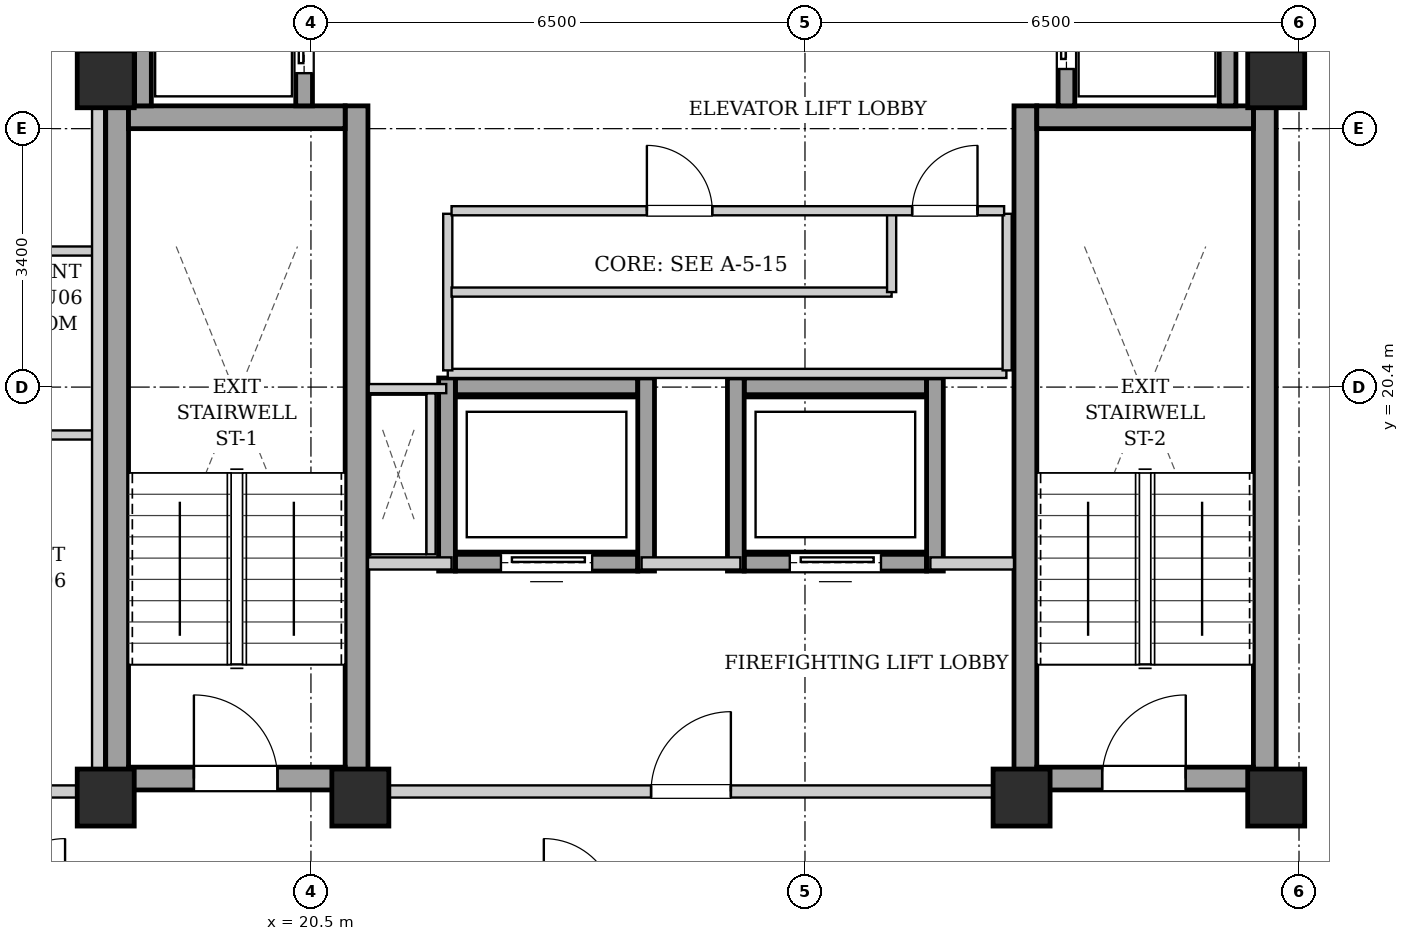
"""IFC4 building model, lengths in metres.
Left out: names, types, materials, properties, quantities, classifications, styles, units other than length and angle.
Written with IfcOpenShell. Run it as: python <this file> out.ifc"""

import sys

from ifc_helpers import new_model, si_unit, direction, frame, frame_2d, origin, origin_2d, place, context, subcontext, project, spatial, rectangle, extrude, element, fill, save


model = new_model("IFC4")
c1 = context("Model", 3, precision=1e-05, world=origin(), true_north=direction((0.0, 1.0)))
c2 = subcontext(c1, "Body", "Model", "MODEL_VIEW")
j1 = project(units=[si_unit("LENGTHUNIT", "METRE"), si_unit("PLANEANGLEUNIT", "RADIAN")], contexts=[c1])
p1 = place(None, origin())
s1 = spatial("IfcSite", under=j1, at=p1, CompositionType="ELEMENT")
p2 = place(p1, origin())
s2 = spatial("IfcBuilding", under=s1, at=p2, CompositionType="ELEMENT")
p3 = place(p2, frame((0.0, 0.0, 220.7)))
s3 = spatial("IfcBuildingStorey", under=s2, at=p3, CompositionType="ELEMENT", Elevation=220.7)
for number, where, z_axis, x_axis in (
    (1, (17.8, 15.0, 0.0), (0.0, 0.0, 1.0), (1.0, 0.0, 0.0)),
    (2, (21.15, 15.0, 0.0), (0.0, 0.0, 1.0), (1.0, 0.0, 0.0)),
    (3, (29.85, 15.0, 0.0), (0.0, 0.0, 1.0), (1.0, 0.0, 0.0)),
    (4, (33.2, 15.0, 0.0), (0.0, 0.0, 1.0), (1.0, 0.0, 0.0)),
    (5, (17.8, 24.45, 0.0), (0.0, 0.0, 1.0), (1.0, 0.0, 0.0)),
    (6, (33.2, 24.45, 0.0), (0.0, 0.0, 1.0), (1.0, 0.0, 0.0)),
):
    element("IfcColumn", number, at=place(p3, frame(where, z_axis=z_axis, x_axis=x_axis)), inside=s3, PredefinedType="COLUMN", context=c2, shape_type="SweptSolid", body=[
        extrude(rectangle(XDim=0.75, YDim=0.75, at=origin_2d()), origin(), (0.0, 0.0, 1.0), 3.4),
    ])
for number, where, z_axis, x_axis in (
    (7, (17.95, 15.1, 0.0), (0.0, 0.0, 1.0), (0.0, 1.0, 0.0)),
    (8, (21.1, 15.1, 0.0), (0.0, 0.0, 1.0), (0.0, 1.0, 0.0)),
):
    element("IfcWall", number, at=place(p3, frame(where, z_axis=z_axis, x_axis=x_axis)), inside=s3, PredefinedType="SHEAR", context=c2, shape_type="SweptSolid", body=[
        extrude(rectangle(XDim=9.0, YDim=0.3, at=frame_2d((4.5, 0.0))), origin(), (0.0, 0.0, 1.0), 3.14),
    ])
p4 = place(p3, frame((18.1, 23.95, 0.0), z_axis=(0.0, 0.0, 1.0), x_axis=(1.0, 0.0, 0.0)))
e9 = element("IfcWall", 9, at=p4, inside=s3, PredefinedType="SHEAR", context=c2, shape_type="SweptSolid", body=[
    extrude(rectangle(XDim=2.85, YDim=0.3, at=frame_2d((1.425, 0.0))), origin(), (0.0, 0.0, 1.0), 3.14),
])
p5 = place(p3, frame((18.1, 15.25, 0.0), z_axis=(0.0, 0.0, 1.0), x_axis=(1.0, 0.0, 0.0)))
e10 = element("IfcWall", 10, at=p5, inside=s3, PredefinedType="SHEAR", context=c2, shape_type="SweptSolid", body=[
    extrude(rectangle(XDim=2.85, YDim=0.3, at=frame_2d((1.425, 0.0))), origin(), (0.0, 0.0, 1.0), 3.14),
])
p6 = place(p5, frame((0.86, 0.0, 0.0)))
e11 = element("IfcOpeningElement", 11, at=p6, cuts=e10, PredefinedType="OPENING", context=c2, shape_type="SweptSolid", body=[
    extrude(rectangle(XDim=1.1, YDim=2.05, at=frame_2d((0.55, 1.025))), frame((0.0, 0.16, 0.0), z_axis=(0.0, -1.0, 0.0), x_axis=(1.0, 0.0, 0.0)), (0.0, 0.0, 1.0), 0.32),
])
for number, where, z_axis, x_axis in (
    (12, (29.9, 15.1, 0.0), (0.0, 0.0, 1.0), (0.0, 1.0, 0.0)),
    (13, (33.05, 15.1, 0.0), (0.0, 0.0, 1.0), (0.0, 1.0, 0.0)),
):
    element("IfcWall", number, at=place(p3, frame(where, z_axis=z_axis, x_axis=x_axis)), inside=s3, PredefinedType="SHEAR", context=c2, shape_type="SweptSolid", body=[
        extrude(rectangle(XDim=9.0, YDim=0.3, at=frame_2d((4.5, 0.0))), origin(), (0.0, 0.0, 1.0), 3.14),
    ])
p7 = place(p3, frame((30.05, 23.95, 0.0), z_axis=(0.0, 0.0, 1.0), x_axis=(1.0, 0.0, 0.0)))
e14 = element("IfcWall", 14, at=p7, inside=s3, PredefinedType="SHEAR", context=c2, shape_type="SweptSolid", body=[
    extrude(rectangle(XDim=2.85, YDim=0.3, at=frame_2d((1.425, 0.0))), origin(), (0.0, 0.0, 1.0), 3.14),
])
p8 = place(p3, frame((30.05, 15.25, 0.0), z_axis=(0.0, 0.0, 1.0), x_axis=(1.0, 0.0, 0.0)))
e15 = element("IfcWall", 15, at=p8, inside=s3, PredefinedType="SHEAR", context=c2, shape_type="SweptSolid", body=[
    extrude(rectangle(XDim=2.85, YDim=0.3, at=frame_2d((1.425, 0.0))), origin(), (0.0, 0.0, 1.0), 3.14),
])
p9 = place(p8, frame((0.86, 0.0, 0.0)))
e16 = element("IfcOpeningElement", 16, at=p9, cuts=e15, PredefinedType="OPENING", context=c2, shape_type="SweptSolid", body=[
    extrude(rectangle(XDim=1.1, YDim=2.05, at=frame_2d((0.55, 1.025))), frame((0.0, 0.16, 0.0), z_axis=(0.0, -1.0, 0.0), x_axis=(1.0, 0.0, 0.0)), (0.0, 0.0, 1.0), 0.32),
])
p10 = place(p3, frame((18.29, 24.1, 0.0), z_axis=(0.0, 0.0, 1.0), x_axis=(0.0, 1.0, 0.0)))
e17 = element("IfcWall", 17, at=p10, inside=s3, PredefinedType="SHEAR", context=c2, shape_type="SweptSolid", body=[
    extrude(rectangle(XDim=4.14, YDim=0.22, at=frame_2d((2.07, 0.0))), origin(), (0.0, 0.0, 1.0), 3.14),
])
p11 = place(p3, frame((20.41, 24.1, 0.0), z_axis=(0.0, 0.0, 1.0), x_axis=(0.0, 1.0, 0.0)))
e18 = element("IfcWall", 18, at=p11, inside=s3, PredefinedType="SHEAR", context=c2, shape_type="SweptSolid", body=[
    extrude(rectangle(XDim=1.96, YDim=0.22, at=frame_2d((0.98, 0.0))), origin(), (0.0, 0.0, 1.0), 3.14),
])
p12 = place(p11, frame((0.43, 0.0, 0.0)))
e19 = element("IfcOpeningElement", 19, at=p12, cuts=e18, PredefinedType="OPENING", context=c2, shape_type="SweptSolid", body=[
    extrude(rectangle(XDim=1.1, YDim=2.15, at=frame_2d((0.55, 1.075))), frame((0.0, 0.12, 0.0), z_axis=(0.0, -1.0, 0.0), x_axis=(1.0, 0.0, 0.0)), (0.0, 0.0, 1.0), 0.24),
])
p13 = place(p3, frame((30.44, 24.1, 0.0), z_axis=(0.0, 0.0, 1.0), x_axis=(0.0, 1.0, 0.0)))
e20 = element("IfcWall", 20, at=p13, inside=s3, PredefinedType="SHEAR", context=c2, shape_type="SweptSolid", body=[
    extrude(rectangle(XDim=2.07, YDim=0.22, at=frame_2d((1.035, 0.0))), origin(), (0.0, 0.0, 1.0), 3.14),
])
p14 = place(p13, frame((0.485, 0.0, 0.0)))
e21 = element("IfcOpeningElement", 21, at=p14, cuts=e20, PredefinedType="OPENING", context=c2, shape_type="SweptSolid", body=[
    extrude(rectangle(XDim=1.1, YDim=2.15, at=frame_2d((0.55, 1.075))), frame((0.0, 0.12, 0.0), z_axis=(0.0, -1.0, 0.0), x_axis=(1.0, 0.0, 0.0)), (0.0, 0.0, 1.0), 0.24),
])
p15 = place(p3, frame((32.56, 24.1, 0.0), z_axis=(0.0, 0.0, 1.0), x_axis=(0.0, 1.0, 0.0)))
e22 = element("IfcWall", 22, at=p15, inside=s3, PredefinedType="SHEAR", context=c2, shape_type="SweptSolid", body=[
    extrude(rectangle(XDim=2.07, YDim=0.22, at=frame_2d((1.035, 0.0))), origin(), (0.0, 0.0, 1.0), 3.14),
])
p16 = place(p3, frame((22.4, 18.09, 0.0), z_axis=(0.0, 0.0, 1.0), x_axis=(1.0, 0.0, 0.0)))
e23 = element("IfcWall", 23, at=p16, inside=s3, PredefinedType="SHEAR", context=c2, shape_type="SweptSolid", body=[
    extrude(rectangle(XDim=2.4, YDim=0.22, at=frame_2d((1.2, 0.0))), origin(), (0.0, 0.0, 1.0), 3.14),
])
p17 = place(p16, frame((0.6, 0.0, 0.0)))
e24 = element("IfcOpeningElement", 24, at=p17, cuts=e23, PredefinedType="OPENING", context=c2, shape_type="SweptSolid", body=[
    extrude(rectangle(XDim=1.2, YDim=2.15, at=frame_2d((0.6, 1.075))), frame((0.0, 0.12, 0.0), z_axis=(0.0, -1.0, 0.0), x_axis=(1.0, 0.0, 0.0)), (0.0, 0.0, 1.0), 0.24),
])
p18 = place(p3, frame((22.4, 20.41, 0.0), z_axis=(0.0, 0.0, 1.0), x_axis=(1.0, 0.0, 0.0)))
e25 = element("IfcWall", 25, at=p18, inside=s3, PredefinedType="SHEAR", context=c2, shape_type="SweptSolid", body=[
    extrude(rectangle(XDim=2.4, YDim=0.22, at=frame_2d((1.2, 0.0))), origin(), (0.0, 0.0, 1.0), 3.14),
])
for number, where, z_axis, x_axis in (
    (26, (22.29, 17.98, 0.0), (0.0, 0.0, 1.0), (0.0, 1.0, 0.0)),
    (27, (24.91, 17.98, 0.0), (0.0, 0.0, 1.0), (0.0, 1.0, 0.0)),
):
    element("IfcWall", number, at=place(p3, frame(where, z_axis=z_axis, x_axis=x_axis)), inside=s3, PredefinedType="SHEAR", context=c2, shape_type="SweptSolid", body=[
        extrude(rectangle(XDim=2.54, YDim=0.22, at=frame_2d((1.27, 0.0))), origin(), (0.0, 0.0, 1.0), 3.14),
    ])
p19 = place(p3, frame((26.2, 18.09, 0.0), z_axis=(0.0, 0.0, 1.0), x_axis=(1.0, 0.0, 0.0)))
e28 = element("IfcWall", 28, at=p19, inside=s3, PredefinedType="SHEAR", context=c2, shape_type="SweptSolid", body=[
    extrude(rectangle(XDim=2.4, YDim=0.22, at=frame_2d((1.2, 0.0))), origin(), (0.0, 0.0, 1.0), 3.14),
])
p20 = place(p19, frame((0.6, 0.0, 0.0)))
e29 = element("IfcOpeningElement", 29, at=p20, cuts=e28, PredefinedType="OPENING", context=c2, shape_type="SweptSolid", body=[
    extrude(rectangle(XDim=1.2, YDim=2.15, at=frame_2d((0.6, 1.075))), frame((0.0, 0.12, 0.0), z_axis=(0.0, -1.0, 0.0), x_axis=(1.0, 0.0, 0.0)), (0.0, 0.0, 1.0), 0.24),
])
p21 = place(p3, frame((26.2, 20.41, 0.0), z_axis=(0.0, 0.0, 1.0), x_axis=(1.0, 0.0, 0.0)))
e30 = element("IfcWall", 30, at=p21, inside=s3, PredefinedType="SHEAR", context=c2, shape_type="SweptSolid", body=[
    extrude(rectangle(XDim=2.4, YDim=0.22, at=frame_2d((1.2, 0.0))), origin(), (0.0, 0.0, 1.0), 3.14),
])
for number, where, z_axis, x_axis in (
    (31, (26.09, 17.98, 0.0), (0.0, 0.0, 1.0), (0.0, 1.0, 0.0)),
    (32, (28.71, 17.98, 0.0), (0.0, 0.0, 1.0), (0.0, 1.0, 0.0)),
):
    element("IfcWall", number, at=place(p3, frame(where, z_axis=z_axis, x_axis=x_axis)), inside=s3, PredefinedType="SHEAR", context=c2, shape_type="SweptSolid", body=[
        extrude(rectangle(XDim=2.54, YDim=0.22, at=frame_2d((1.27, 0.0))), origin(), (0.0, 0.0, 1.0), 3.14),
    ])
p22 = place(p3, frame((21.25, 15.08, 0.0), z_axis=(0.0, 0.0, 1.0), x_axis=(1.0, 0.0, 0.0)))
e33 = element("IfcWall", 33, at=p22, inside=s3, PredefinedType="PARTITIONING", context=c2, shape_type="SweptSolid", body=[
    extrude(rectangle(XDim=8.5, YDim=0.16, at=frame_2d((4.25, 0.0))), origin(), (0.0, 0.0, 1.0), 2.668),
])
p23 = place(p22, frame((3.725, 0.0, 0.0)))
e34 = element("IfcOpeningElement", 34, at=p23, cuts=e33, PredefinedType="OPENING", context=c2, shape_type="SweptSolid", body=[
    extrude(rectangle(XDim=1.05, YDim=2.05, at=frame_2d((0.525, 1.025))), frame((0.0, 0.09, 0.0), z_axis=(0.0, -1.0, 0.0), x_axis=(1.0, 0.0, 0.0)), (0.0, 0.0, 1.0), 0.18),
])
p24 = place(p3, frame((21.25, 18.08, 0.0), z_axis=(0.0, 0.0, 1.0), x_axis=(1.0, 0.0, 0.0)))
e35 = element("IfcWall", 35, at=p24, inside=s3, PredefinedType="PARTITIONING", context=c2, shape_type="SweptSolid", body=[
    extrude(rectangle(XDim=1.1, YDim=0.16, at=frame_2d((0.55, 0.0))), origin(), (0.0, 0.0, 1.0), 3.14),
])
p25 = place(p3, frame((24.85, 18.08, 0.0), z_axis=(0.0, 0.0, 1.0), x_axis=(1.0, 0.0, 0.0)))
e36 = element("IfcWall", 36, at=p25, inside=s3, PredefinedType="PARTITIONING", context=c2, shape_type="SweptSolid", body=[
    extrude(rectangle(XDim=1.3, YDim=0.16, at=frame_2d((0.65, 0.0))), origin(), (0.0, 0.0, 1.0), 3.14),
])
p26 = place(p3, frame((28.65, 18.08, 0.0), z_axis=(0.0, 0.0, 1.0), x_axis=(1.0, 0.0, 0.0)))
e37 = element("IfcWall", 37, at=p26, inside=s3, PredefinedType="PARTITIONING", context=c2, shape_type="SweptSolid", body=[
    extrude(rectangle(XDim=1.1, YDim=0.16, at=frame_2d((0.55, 0.0))), origin(), (0.0, 0.0, 1.0), 3.14),
])
for number, where, z_axis, x_axis in (
    (38, (17.88, 24.12, 0.0), (0.0, 0.0, 1.0), (0.0, 1.0, 0.0)),
    (39, (33.12, 24.12, 0.0), (0.0, 0.0, 1.0), (0.0, 1.0, 0.0)),
):
    element("IfcWall", number, at=place(p3, frame(where, z_axis=z_axis, x_axis=x_axis)), inside=s3, PredefinedType="PARTITIONING", context=c2, shape_type="SweptSolid", body=[
        extrude(rectangle(XDim=4.76, YDim=0.16, at=frame_2d((2.38, 0.0))), origin(), (0.0, 0.0, 1.0), 3.14),
    ])
p27 = place(p3, frame((22.08, 18.2, 0.0), z_axis=(0.0, 0.0, 1.0), x_axis=(0.0, 1.0, 0.0)))
e40 = element("IfcWall", 40, at=p27, inside=s3, PredefinedType="PARTITIONING", context=c2, shape_type="SweptSolid", body=[
    extrude(rectangle(XDim=2.12, YDim=0.12, at=frame_2d((1.06, 0.0))), origin(), (0.0, 0.0, 1.0), 3.14),
])
p28 = place(p3, frame((22.28, 20.38, 0.0), z_axis=(0.0, 0.0, 1.0), x_axis=(-1.0, 0.0, 0.0)))
e41 = element("IfcWall", 41, at=p28, inside=s3, PredefinedType="PARTITIONING", context=c2, shape_type="SweptSolid", body=[
    extrude(rectangle(XDim=1.02, YDim=0.12, at=frame_2d((0.51, 0.0))), origin(), (0.0, 0.0, 1.0), 3.14),
])
p29 = place(p3, frame((22.3, 20.58, 0.0), z_axis=(0.0, 0.0, 1.0), x_axis=(1.0, 0.0, 0.0)))
e42 = element("IfcWall", 42, at=p29, inside=s3, PredefinedType="PARTITIONING", context=c2, shape_type="SweptSolid", body=[
    extrude(rectangle(XDim=7.35, YDim=0.12, at=frame_2d((3.675, 0.0))), origin(), (0.0, 0.0, 1.0), 3.14),
])
for number, where, z_axis, x_axis in (
    (43, (22.3, 20.62, 0.0), (0.0, 0.0, 1.0), (0.0, 1.0, 0.0)),
    (44, (29.66, 20.62, 0.0), (0.0, 0.0, 1.0), (0.0, 1.0, 0.0)),
):
    element("IfcWall", number, at=place(p3, frame(where, z_axis=z_axis, x_axis=x_axis)), inside=s3, PredefinedType="PARTITIONING", context=c2, shape_type="SweptSolid", body=[
        extrude(rectangle(XDim=2.06, YDim=0.12, at=frame_2d((1.03, 0.0))), origin(), (0.0, 0.0, 1.0), 3.14),
    ])
p30 = place(p3, frame((22.35, 21.65, 0.0), z_axis=(0.0, 0.0, 1.0), x_axis=(1.0, 0.0, 0.0)))
e45 = element("IfcWall", 45, at=p30, inside=s3, PredefinedType="PARTITIONING", context=c2, shape_type="SweptSolid", body=[
    extrude(rectangle(XDim=5.79, YDim=0.12, at=frame_2d((2.895, 0.0))), origin(), (0.0, 0.0, 1.0), 3.14),
])
p31 = place(p3, frame((28.14, 21.65, 0.0), z_axis=(0.0, 0.0, 1.0), x_axis=(0.0, 1.0, 0.0)))
e46 = element("IfcWall", 46, at=p31, inside=s3, PredefinedType="PARTITIONING", context=c2, shape_type="SweptSolid", body=[
    extrude(rectangle(XDim=1.03, YDim=0.12, at=frame_2d((0.515, 0.0))), origin(), (0.0, 0.0, 1.0), 3.14),
])
p32 = place(p3, frame((22.35, 22.72, 0.0), z_axis=(0.0, 0.0, 1.0), x_axis=(1.0, 0.0, 0.0)))
e47 = element("IfcWall", 47, at=p32, inside=s3, PredefinedType="PARTITIONING", context=c2, shape_type="SweptSolid", body=[
    extrude(rectangle(XDim=7.27, YDim=0.12, at=frame_2d((3.635, 0.0))), origin(), (0.0, 0.0, 1.0), 3.14),
])
p33 = place(p32, frame((2.57, 0.0, 0.0)))
e48 = element("IfcOpeningElement", 48, at=p33, cuts=e47, PredefinedType="OPENING", context=c2, shape_type="SweptSolid", body=[
    extrude(rectangle(XDim=0.86, YDim=2.05, at=frame_2d((0.43, 1.025))), frame((0.0, 0.07, 0.0), z_axis=(0.0, -1.0, 0.0), x_axis=(1.0, 0.0, 0.0)), (0.0, 0.0, 1.0), 0.14),
])
p34 = place(p32, frame((6.06, 0.0, 0.0)))
e49 = element("IfcOpeningElement", 49, at=p34, cuts=e47, PredefinedType="OPENING", context=c2, shape_type="SweptSolid", body=[
    extrude(rectangle(XDim=0.86, YDim=2.05, at=frame_2d((0.43, 1.025))), frame((0.0, 0.07, 0.0), z_axis=(0.0, -1.0, 0.0), x_axis=(1.0, 0.0, 0.0)), (0.0, 0.0, 1.0), 0.14),
])
p35 = place(p3, frame((10.88, 15.08, 0.0), z_axis=(0.0, 0.0, 1.0), x_axis=(1.0, 0.0, 0.0)))
e50 = element("IfcWall", 50, at=p35, inside=s3, PredefinedType="PARTITIONING", context=c2, shape_type="SweptSolid", body=[
    extrude(rectangle(XDim=6.88, YDim=0.16, at=frame_2d((3.44, 0.0))), origin(), (0.0, 0.0, 1.0), 2.668),
])
p36 = place(p35, frame((5.06, 0.0, 0.0)))
e51 = element("IfcOpeningElement", 51, at=p36, cuts=e50, PredefinedType="OPENING", context=c2, shape_type="SweptSolid", body=[
    extrude(rectangle(XDim=0.95, YDim=2.1, at=frame_2d((0.475, 1.05))), frame((0.0, 0.09, 0.0), z_axis=(0.0, -1.0, 0.0), x_axis=(1.0, 0.0, 0.0)), (0.0, 0.0, 1.0), 0.18),
])
p37 = place(p3, frame((15.19, 22.19, 0.0), z_axis=(0.0, 0.0, 1.0), x_axis=(1.0, 0.0, 0.0)))
e52 = element("IfcWall", 52, at=p37, inside=s3, PredefinedType="PARTITIONING", context=c2, shape_type="SweptSolid", body=[
    extrude(rectangle(XDim=2.45, YDim=0.12, at=frame_2d((1.225, 0.0))), origin(), (0.0, 0.0, 1.0), 3.14),
])
p38 = place(p3, frame((15.19, 19.77, 0.0), z_axis=(0.0, 0.0, 1.0), x_axis=(1.0, 0.0, 0.0)))
e53 = element("IfcWall", 53, at=p38, inside=s3, PredefinedType="PARTITIONING", context=c2, shape_type="SweptSolid", body=[
    extrude(rectangle(XDim=2.45, YDim=0.12, at=frame_2d((1.225, 0.0))), origin(), (0.0, 0.0, 1.0), 3.14),
])
p39 = place(p38, frame((0.795, 0.0, 0.0)))
e54 = element("IfcOpeningElement", 54, at=p39, cuts=e53, PredefinedType="OPENING", context=c2, shape_type="SweptSolid", body=[
    extrude(rectangle(XDim=0.86, YDim=2.05, at=frame_2d((0.43, 1.025))), frame((0.0, 0.07, 0.0), z_axis=(0.0, -1.0, 0.0), x_axis=(1.0, 0.0, 0.0)), (0.0, 0.0, 1.0), 0.14),
])
p40 = place(p3, frame((17.7, 15.02, 0.0), z_axis=(0.0, 0.0, 1.0), x_axis=(0.0, 1.0, 0.0)))
e55 = element("IfcWall", 55, at=p40, inside=s3, PredefinedType="PARTITIONING", context=c2, shape_type="SweptSolid", body=[
    extrude(rectangle(XDim=13.98, YDim=0.16, at=frame_2d((6.99, 0.0))), origin(), (0.0, 0.0, 1.0), 3.14),
])
p41 = place(p6, origin())
e56 = element("IfcDoor", 56, at=p41, inside=s3, OperationType="SINGLE_SWING_LEFT", PredefinedType="DOOR", context=c2, shape_type="SweptSolid", body=[
    extrude(rectangle(XDim=1.1, YDim=2.05, at=frame_2d((0.55, 1.025))), frame((0.0, 0.025, 0.0), z_axis=(0.0, -1.0, 0.0), x_axis=(1.0, 0.0, 0.0)), (0.0, 0.0, 1.0), 0.05),
])
fill(e11, e56)
p42 = place(p9, origin())
e57 = element("IfcDoor", 57, at=p42, inside=s3, OperationType="SINGLE_SWING_RIGHT", PredefinedType="DOOR", context=c2, shape_type="SweptSolid", body=[
    extrude(rectangle(XDim=1.1, YDim=2.05, at=frame_2d((0.55, 1.025))), frame((0.0, 0.025, 0.0), z_axis=(0.0, -1.0, 0.0), x_axis=(1.0, 0.0, 0.0)), (0.0, 0.0, 1.0), 0.05),
])
fill(e16, e57)
p43 = place(p12, origin())
e58 = element("IfcDoor", 58, at=p43, inside=s3, OperationType="SLIDING_TO_LEFT", PredefinedType="DOOR", context=c2, shape_type="SweptSolid", body=[
    extrude(rectangle(XDim=1.1, YDim=2.15, at=frame_2d((0.55, 1.075))), frame((0.0, 0.025, 0.0), z_axis=(0.0, -1.0, 0.0), x_axis=(1.0, 0.0, 0.0)), (0.0, 0.0, 1.0), 0.05),
])
fill(e19, e58)
p44 = place(p14, origin())
e59 = element("IfcDoor", 59, at=p44, inside=s3, OperationType="SLIDING_TO_LEFT", PredefinedType="DOOR", context=c2, shape_type="SweptSolid", body=[
    extrude(rectangle(XDim=1.1, YDim=2.15, at=frame_2d((0.55, 1.075))), frame((0.0, 0.025, 0.0), z_axis=(0.0, -1.0, 0.0), x_axis=(1.0, 0.0, 0.0)), (0.0, 0.0, 1.0), 0.05),
])
fill(e21, e59)
p45 = place(p17, origin())
e60 = element("IfcDoor", 60, at=p45, inside=s3, OperationType="SLIDING_TO_LEFT", PredefinedType="DOOR", context=c2, shape_type="SweptSolid", body=[
    extrude(rectangle(XDim=1.2, YDim=2.15, at=frame_2d((0.6, 1.075))), frame((0.0, 0.025, 0.0), z_axis=(0.0, -1.0, 0.0), x_axis=(1.0, 0.0, 0.0)), (0.0, 0.0, 1.0), 0.05),
])
fill(e24, e60)
p46 = place(p20, origin())
e61 = element("IfcDoor", 61, at=p46, inside=s3, OperationType="SLIDING_TO_LEFT", PredefinedType="DOOR", context=c2, shape_type="SweptSolid", body=[
    extrude(rectangle(XDim=1.2, YDim=2.15, at=frame_2d((0.6, 1.075))), frame((0.0, 0.025, 0.0), z_axis=(0.0, -1.0, 0.0), x_axis=(1.0, 0.0, 0.0)), (0.0, 0.0, 1.0), 0.05),
])
fill(e29, e61)
p47 = place(p23, origin())
e62 = element("IfcDoor", 62, at=p47, inside=s3, OperationType="SINGLE_SWING_RIGHT", PredefinedType="DOOR", context=c2, shape_type="SweptSolid", body=[
    extrude(rectangle(XDim=1.05, YDim=2.05, at=frame_2d((0.525, 1.025))), frame((0.0, 0.025, 0.0), z_axis=(0.0, -1.0, 0.0), x_axis=(1.0, 0.0, 0.0)), (0.0, 0.0, 1.0), 0.05),
])
fill(e34, e62)
p48 = place(p33, origin())
e63 = element("IfcDoor", 63, at=p48, inside=s3, OperationType="SINGLE_SWING_LEFT", PredefinedType="DOOR", context=c2, shape_type="SweptSolid", body=[
    extrude(rectangle(XDim=0.86, YDim=2.05, at=frame_2d((0.43, 1.025))), frame((0.0, 0.025, 0.0), z_axis=(0.0, -1.0, 0.0), x_axis=(1.0, 0.0, 0.0)), (0.0, 0.0, 1.0), 0.05),
])
fill(e48, e63)
p49 = place(p34, origin())
e64 = element("IfcDoor", 64, at=p49, inside=s3, OperationType="SINGLE_SWING_RIGHT", PredefinedType="DOOR", context=c2, shape_type="SweptSolid", body=[
    extrude(rectangle(XDim=0.86, YDim=2.05, at=frame_2d((0.43, 1.025))), frame((0.0, 0.025, 0.0), z_axis=(0.0, -1.0, 0.0), x_axis=(1.0, 0.0, 0.0)), (0.0, 0.0, 1.0), 0.05),
])
fill(e49, e64)
save(model, sys.argv[1])
